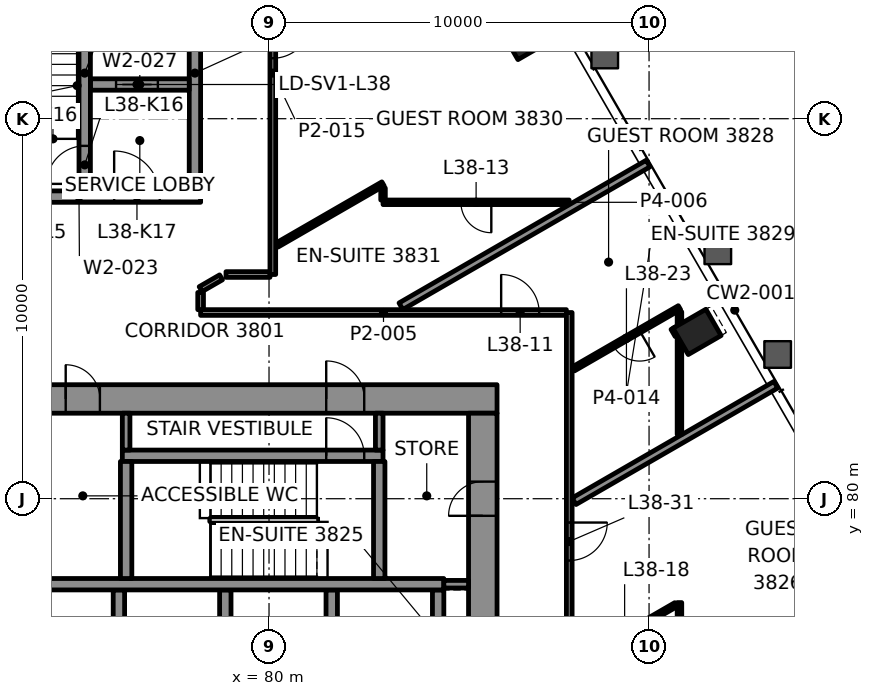
"""IFC4 building model, lengths in metres.
Left out: names, types, materials, properties, quantities, classifications, styles, units other than length and angle.
Written with IfcOpenShell. Run it as: python <this file> out.ifc"""

import sys

from ifc_helpers import new_model, si_unit, direction, frame, frame_2d, origin, origin_2d, place, context, subcontext, project, spatial, rectangle, hollow_rectangle, extrude, element, fill, save


model = new_model("IFC4")
c1 = context("Model", 3, precision=1e-05, world=origin(), true_north=direction((0.0, 1.0)))
c2 = subcontext(c1, "Body", "Model", "MODEL_VIEW")
j1 = project(units=[si_unit("LENGTHUNIT", "METRE"), si_unit("PLANEANGLEUNIT", "RADIAN")], contexts=[c1])
p1 = place(None, origin())
s1 = spatial("IfcSite", under=j1, at=p1, CompositionType="ELEMENT")
p2 = place(p1, origin())
s2 = spatial("IfcBuilding", under=s1, at=p2, CompositionType="ELEMENT")
p3 = place(p2, frame((0.0, 0.0, 167.5)))
s3 = spatial("IfcBuildingStorey", under=s2, at=p3, CompositionType="ELEMENT", Elevation=167.5)
for number, where, z_axis, x_axis in (
    (1, (91.263, 84.39, -0.0), (0.0, 0.0, 1.0), (-0.5, 0.866, 0.0)),
    (2, (86.782, 92.151, -0.0), (0.0, 0.0, 1.0), (-0.5, 0.866, 0.0)),
):
    element("IfcColumn", number, at=place(p3, frame(where, z_axis=z_axis, x_axis=x_axis)), inside=s3, PredefinedType="COLUMN", context=c2, shape_type="SweptSolid", body=[
        extrude(hollow_rectangle(XDim=0.8, YDim=1.0, WallThickness=0.05, at=origin_2d()), origin(), (0.0, 0.0, 1.0), 3.9),
    ])
p4 = place(p3, frame((64.0, 82.625, 0.0), z_axis=(0.0, 0.0, 1.0), x_axis=(1.0, 0.0, 0.0)))
e3 = element("IfcWall", 3, at=p4, inside=s3, PredefinedType="SHEAR", context=c2, shape_type="SweptSolid", body=[
    extrude(rectangle(XDim=22.0, YDim=0.75, at=frame_2d((11.0, 0.0))), origin(), (0.0, 0.0, 1.0), 3.7),
])
p5 = place(p4, frame((3.695, 0.0, 0.0)))
e4 = element("IfcOpeningElement", 4, at=p5, cuts=e3, PredefinedType="OPENING", context=c2, shape_type="SweptSolid", body=[
    extrude(rectangle(XDim=1.0, YDim=2.1, at=frame_2d((0.5, 1.05))), frame((0.0, 0.385, 0.0), z_axis=(0.0, -1.0, 0.0), x_axis=(1.0, 0.0, 0.0)), (0.0, 0.0, 1.0), 0.77),
])
p6 = place(p4, frame((17.505, 0.0, 0.0)))
e5 = element("IfcOpeningElement", 5, at=p6, cuts=e3, PredefinedType="OPENING", context=c2, shape_type="SweptSolid", body=[
    extrude(rectangle(XDim=1.0, YDim=2.1, at=frame_2d((0.5, 1.05))), frame((0.0, 0.385, 0.0), z_axis=(0.0, -1.0, 0.0), x_axis=(1.0, 0.0, 0.0)), (0.0, 0.0, 1.0), 0.77),
])
p7 = place(p4, frame((10.65, 0.0, 0.0)))
e6 = element("IfcOpeningElement", 6, at=p7, cuts=e3, PredefinedType="OPENING", context=c2, shape_type="SweptSolid", body=[
    extrude(rectangle(XDim=0.9, YDim=2.1, at=frame_2d((0.45, 1.05))), frame((0.0, 0.385, 0.0), z_axis=(0.0, -1.0, 0.0), x_axis=(1.0, 0.0, 0.0)), (0.0, 0.0, 1.0), 0.77),
])
p8 = place(p3, frame((85.625, 67.75, 0.0), z_axis=(0.0, 0.0, 1.0), x_axis=(0.0, 1.0, 0.0)))
e7 = element("IfcWall", 7, at=p8, inside=s3, PredefinedType="SHEAR", context=c2, shape_type="SweptSolid", body=[
    extrude(rectangle(XDim=14.5, YDim=0.75, at=frame_2d((7.25, 0.0))), origin(), (0.0, 0.0, 1.0), 3.7),
])
p9 = place(p8, frame((4.65, 0.0, 0.0)))
e8 = element("IfcOpeningElement", 8, at=p9, cuts=e7, PredefinedType="OPENING", context=c2, shape_type="SweptSolid", body=[
    extrude(rectangle(XDim=1.8, YDim=2.1, at=frame_2d((0.9, 1.05))), frame((0.0, 0.385, 0.0), z_axis=(0.0, -1.0, 0.0), x_axis=(1.0, 0.0, 0.0)), (0.0, 0.0, 1.0), 0.77),
])
p10 = place(p8, frame((11.8, 0.0, 0.0)))
e9 = element("IfcOpeningElement", 9, at=p10, cuts=e7, PredefinedType="OPENING", context=c2, shape_type="SweptSolid", body=[
    extrude(rectangle(XDim=0.9, YDim=2.1, at=frame_2d((0.45, 1.05))), frame((0.0, 0.385, 0.0), z_axis=(0.0, -1.0, 0.0), x_axis=(1.0, 0.0, 0.0)), (0.0, 0.0, 1.0), 0.77),
])
for number, where, z_axis, x_axis in (
    (10, (76.05, 75.0, 0.0), (0.0, 0.0, 1.0), (0.0, 1.0, 0.0)),
    (11, (78.85, 75.0, 0.0), (0.0, 0.0, 1.0), (0.0, 1.0, 0.0)),
    (12, (81.65, 75.0, 0.0), (0.0, 0.0, 1.0), (0.0, 1.0, 0.0)),
    (13, (84.45, 75.0, 0.0), (0.0, 0.0, 1.0), (0.0, 1.0, 0.0)),
):
    element("IfcWall", number, at=place(p3, frame(where, z_axis=z_axis, x_axis=x_axis)), inside=s3, PredefinedType="SHEAR", context=c2, shape_type="SweptSolid", body=[
        extrude(rectangle(XDim=2.6, YDim=0.3, at=frame_2d((1.3, 0.0))), origin(), (0.0, 0.0, 1.0), 3.7),
    ])
p11 = place(p3, frame((67.15, 77.75, 0.0), z_axis=(0.0, 0.0, 1.0), x_axis=(1.0, 0.0, 0.0)))
e14 = element("IfcWall", 14, at=p11, inside=s3, PredefinedType="SHEAR", context=c2, shape_type="SweptSolid", body=[
    extrude(rectangle(XDim=17.45, YDim=0.3, at=frame_2d((8.725, 0.0))), origin(), (0.0, 0.0, 1.0), 3.7),
])
p12 = place(p11, frame((0.545, 0.0, 0.0)))
e15 = element("IfcOpeningElement", 15, at=p12, cuts=e14, PredefinedType="OPENING", context=c2, shape_type="SweptSolid", body=[
    extrude(rectangle(XDim=1.0, YDim=2.1, at=frame_2d((0.5, 1.05))), frame((0.0, 0.16, 0.0), z_axis=(0.0, -1.0, 0.0), x_axis=(1.0, 0.0, 0.0)), (0.0, 0.0, 1.0), 0.32),
])
p13 = place(p3, frame((76.14, 81.13, 0.0), z_axis=(0.0, 0.0, 1.0), x_axis=(1.0, 0.0, 0.0)))
e16 = element("IfcWall", 16, at=p13, inside=s3, PredefinedType="SHEAR", context=c2, shape_type="SweptSolid", body=[
    extrude(rectangle(XDim=6.86, YDim=0.3, at=frame_2d((3.43, 0.0))), origin(), (0.0, 0.0, 1.0), 3.7),
])
p14 = place(p13, frame((5.365, 0.0, 0.0)))
e17 = element("IfcOpeningElement", 17, at=p14, cuts=e16, PredefinedType="OPENING", context=c2, shape_type="SweptSolid", body=[
    extrude(rectangle(XDim=1.0, YDim=2.1, at=frame_2d((0.5, 1.05))), frame((0.0, 0.16, 0.0), z_axis=(0.0, -1.0, 0.0), x_axis=(1.0, 0.0, 0.0)), (0.0, 0.0, 1.0), 0.32),
])
for number, where, z_axis, x_axis in (
    (18, (76.24, 77.9, 0.0), (0.0, 0.0, 1.0), (0.0, 1.0, 0.0)),
    (19, (82.9, 77.9, 0.0), (0.0, 0.0, 1.0), (0.0, 1.0, 0.0)),
):
    element("IfcWall", number, at=place(p3, frame(where, z_axis=z_axis, x_axis=x_axis)), inside=s3, PredefinedType="SHEAR", context=c2, shape_type="SweptSolid", body=[
        extrude(rectangle(XDim=3.08, YDim=0.3, at=frame_2d((1.54, 0.0))), origin(), (0.0, 0.0, 1.0), 3.7),
    ])
p15 = place(p3, frame((71.8, 87.95, 0.0), z_axis=(0.0, 0.0, 1.0), x_axis=(1.0, 0.0, 0.0)))
e20 = element("IfcWall", 20, at=p15, inside=s3, PredefinedType="SHEAR", context=c2, shape_type="SweptSolid", body=[
    extrude(rectangle(XDim=6.4, YDim=0.3, at=frame_2d((3.2, 0.0))), origin(), (0.0, 0.0, 1.0), 3.7),
])
p16 = place(p15, frame((1.325, 0.0, 0.0)))
e21 = element("IfcOpeningElement", 21, at=p16, cuts=e20, PredefinedType="OPENING", context=c2, shape_type="SweptSolid", body=[
    extrude(rectangle(XDim=1.0, YDim=2.1, at=frame_2d((0.5, 1.05))), frame((0.0, 0.16, 0.0), z_axis=(0.0, -1.0, 0.0), x_axis=(1.0, 0.0, 0.0)), (0.0, 0.0, 1.0), 0.32),
])
p17 = place(p15, frame((4.125, 0.0, 0.0)))
e22 = element("IfcOpeningElement", 22, at=p17, cuts=e20, PredefinedType="OPENING", context=c2, shape_type="SweptSolid", body=[
    extrude(rectangle(XDim=1.2, YDim=2.1, at=frame_2d((0.6, 1.05))), frame((0.0, 0.16, 0.0), z_axis=(0.0, -1.0, 0.0), x_axis=(1.0, 0.0, 0.0)), (0.0, 0.0, 1.0), 0.32),
])
p18 = place(p3, frame((78.05, 88.1, 0.0), z_axis=(0.0, 0.0, 1.0), x_axis=(0.0, 1.0, 0.0)))
e23 = element("IfcWall", 23, at=p18, inside=s3, PredefinedType="SHEAR", context=c2, shape_type="SweptSolid", body=[
    extrude(rectangle(XDim=6.2, YDim=0.3, at=frame_2d((3.1, 0.0))), origin(), (0.0, 0.0, 1.0), 3.7),
])
p19 = place(p3, frame((75.3, 90.9, 0.0), z_axis=(0.0, 0.0, 1.0), x_axis=(1.0, 0.0, 0.0)))
e24 = element("IfcWall", 24, at=p19, inside=s3, PredefinedType="SHEAR", context=c2, shape_type="SweptSolid", body=[
    extrude(rectangle(XDim=2.6, YDim=0.3, at=frame_2d((1.3, 0.0))), origin(), (0.0, 0.0, 1.0), 3.7),
])
p20 = place(p19, frame((0.675, 0.0, 0.0)))
e25 = element("IfcOpeningElement", 25, at=p20, cuts=e24, PredefinedType="OPENING", context=c2, shape_type="SweptSolid", body=[
    extrude(rectangle(XDim=1.1, YDim=2.1, at=frame_2d((0.55, 1.05))), frame((0.0, 0.16, 0.0), z_axis=(0.0, -1.0, 0.0), x_axis=(1.0, 0.0, 0.0)), (0.0, 0.0, 1.0), 0.32),
])
p21 = place(p3, frame((75.15, 88.1, 0.0), z_axis=(0.0, 0.0, 1.0), x_axis=(0.0, 1.0, 0.0)))
e26 = element("IfcWall", 26, at=p21, inside=s3, PredefinedType="SHEAR", context=c2, shape_type="SweptSolid", body=[
    extrude(rectangle(XDim=6.2, YDim=0.3, at=frame_2d((3.1, 0.0))), origin(), (0.0, 0.0, 1.0), 3.7),
])
p22 = place(p21, frame((0.185, 0.0, 0.0)))
e27 = element("IfcOpeningElement", 27, at=p22, cuts=e26, PredefinedType="OPENING", context=c2, shape_type="SweptSolid", body=[
    extrude(rectangle(XDim=1.0, YDim=2.1, at=frame_2d((0.5, 1.05))), frame((0.0, 0.16, 0.0), z_axis=(0.0, -1.0, 0.0), x_axis=(1.0, 0.0, 0.0)), (0.0, 0.0, 1.0), 0.32),
])
p23 = place(p3, frame((78.2, 84.9, 0.0), z_axis=(0.0, 0.0, 1.0), x_axis=(1.0, 0.0, 0.0)))
e28 = element("IfcWall", 28, at=p23, inside=s3, PredefinedType="PARTITIONING", context=c2, shape_type="SweptSolid", body=[
    extrude(rectangle(XDim=9.625, YDim=0.15, at=frame_2d((4.812, 0.0))), origin(), (0.0, 0.0, 1.0), 3.1),
])
p24 = place(p23, frame((7.908, 0.0, 0.0)))
e29 = element("IfcOpeningElement", 29, at=p24, cuts=e28, PredefinedType="OPENING", context=c2, shape_type="SweptSolid", body=[
    extrude(rectangle(XDim=1.0, YDim=2.1, at=frame_2d((0.5, 1.05))), frame((0.0, 0.085, 0.0), z_axis=(0.0, -1.0, 0.0), x_axis=(1.0, 0.0, 0.0)), (0.0, 0.0, 1.0), 0.17),
])
p25 = place(p3, frame((78.868, 85.9, 0.0), z_axis=(0.0, 0.0, 1.0), x_axis=(1.0, 0.0, 0.0)))
e30 = element("IfcWall", 30, at=p25, inside=s3, PredefinedType="PARTITIONING", context=c2, shape_type="SweptSolid", body=[
    extrude(rectangle(XDim=1.157, YDim=0.15, at=frame_2d((0.578, 0.0))), origin(), (0.0, 0.0, 1.0), 3.1),
])
p26 = place(p3, frame((87.898, 87.8, 0.0), z_axis=(0.0, 0.0, 1.0), x_axis=(-1.0, 0.0, 0.0)))
e31 = element("IfcWall", 31, at=p26, inside=s3, PredefinedType="PARTITIONING", context=c2, shape_type="SweptSolid", body=[
    extrude(rectangle(XDim=4.898, YDim=0.12, at=frame_2d((2.449, 0.0))), origin(), (0.0, 0.0, 1.0), 3.1),
])
p27 = place(p26, frame((2.049, 0.0, 0.0)))
e32 = element("IfcOpeningElement", 32, at=p27, cuts=e31, PredefinedType="OPENING", context=c2, shape_type="SweptSolid", body=[
    extrude(rectangle(XDim=0.8, YDim=2.1, at=frame_2d((0.4, 1.05))), frame((0.0, 0.07, 0.0), z_axis=(0.0, -1.0, 0.0), x_axis=(1.0, 0.0, 0.0)), (0.0, 0.0, 1.0), 0.14),
])
p28 = place(p3, frame((90.705, 77.212, 0.0), z_axis=(0.0, 0.0, 1.0), x_axis=(-0.866009247561, -0.500027982357, 0.0)))
e33 = element("IfcWall", 33, at=p28, inside=s3, PredefinedType="PARTITIONING", context=c2, shape_type="SweptSolid", body=[
    extrude(rectangle(XDim=3.113, YDim=0.12, at=frame_2d((1.556, 0.0))), origin(), (0.0, 0.0, 1.0), 3.1),
])
p29 = place(p28, frame((1.156, 0.0, 0.0)))
e34 = element("IfcOpeningElement", 34, at=p29, cuts=e33, PredefinedType="OPENING", context=c2, shape_type="SweptSolid", body=[
    extrude(rectangle(XDim=0.8, YDim=2.1, at=frame_2d((0.4, 1.05))), frame((0.0, 0.07, 0.0), z_axis=(0.0, -1.0, 0.0), x_axis=(1.0, 0.0, 0.0)), (0.0, 0.0, 1.0), 0.14),
])
p30 = place(p3, frame((88.027, 79.934, 0.0), z_axis=(0.0, 0.0, 1.0), x_axis=(0.866029087811, 0.499993619025, 0.0)))
e35 = element("IfcWall", 35, at=p30, inside=s3, PredefinedType="PARTITIONING", context=c2, shape_type="SweptSolid", body=[
    extrude(rectangle(XDim=6.131, YDim=0.2, at=frame_2d((3.065, 0.0))), origin(), (0.0, 0.0, 1.0), 3.022),
])
p31 = place(p3, frame((90.8, 85.028, 0.0), z_axis=(0.0, 0.0, 1.0), x_axis=(-0.866010186656, -0.500026355914, 0.0)))
e36 = element("IfcWall", 36, at=p31, inside=s3, PredefinedType="PARTITIONING", context=c2, shape_type="SweptSolid", body=[
    extrude(rectangle(XDim=3.222, YDim=0.12, at=frame_2d((1.611, 0.0))), origin(), (0.0, 0.0, 1.0), 3.022),
])
p32 = place(p31, frame((1.211, 0.0, 0.0)))
e37 = element("IfcOpeningElement", 37, at=p32, cuts=e36, PredefinedType="OPENING", context=c2, shape_type="SweptSolid", body=[
    extrude(rectangle(XDim=0.8, YDim=2.1, at=frame_2d((0.4, 1.05))), frame((0.0, 0.07, 0.0), z_axis=(0.0, -1.0, 0.0), x_axis=(1.0, 0.0, 0.0)), (0.0, 0.0, 1.0), 0.14),
])
p33 = place(p3, frame((83.471, 85.065, 0.0), z_axis=(0.0, 0.0, 1.0), x_axis=(0.866022108301, 0.500005707901, 0.0)))
e38 = element("IfcWall", 38, at=p33, inside=s3, PredefinedType="PARTITIONING", context=c2, shape_type="SweptSolid", body=[
    extrude(rectangle(XDim=7.511, YDim=0.2, at=frame_2d((3.755, 0.0))), origin(), (0.0, 0.0, 1.0), 3.022),
])
p34 = place(p3, frame((78.2, 85.515, 0.0), z_axis=(0.0, 0.0, 1.0), x_axis=(0.866035156036, 0.499983108224, 0.0)))
e39 = element("IfcWall", 39, at=p34, inside=s3, PredefinedType="PARTITIONING", context=c2, shape_type="SweptSolid", body=[
    extrude(rectangle(XDim=0.622, YDim=0.15, at=frame_2d((0.311, 0.0))), origin(), (0.0, 0.0, 1.0), 3.1),
])
p35 = place(p3, frame((80.209, 86.675, 0.0), z_axis=(0.0, 0.0, 1.0), x_axis=(0.86604299788, 0.499969524894, 0.0)))
e40 = element("IfcWall", 40, at=p35, inside=s3, PredefinedType="PARTITIONING", context=c2, shape_type="SweptSolid", body=[
    extrude(rectangle(XDim=3.222, YDim=0.12, at=frame_2d((1.611, 0.0))), origin(), (0.0, 0.0, 1.0), 3.1),
])
p36 = place(p3, frame((90.8, 73.929, 0.0), z_axis=(0.0, 0.0, 1.0), x_axis=(0.0, 1.0, 0.0)))
e41 = element("IfcWall", 41, at=p36, inside=s3, PredefinedType="PARTITIONING", context=c2, shape_type="SweptSolid", body=[
    extrude(rectangle(XDim=3.337, YDim=0.12, at=frame_2d((1.668, 0.0))), origin(), (0.0, 0.0, 1.0), 3.1),
])
p37 = place(p3, frame((90.8, 81.69, 0.0), z_axis=(0.0, 0.0, 1.0), x_axis=(0.0, 1.0, 0.0)))
e42 = element("IfcWall", 42, at=p37, inside=s3, PredefinedType="PARTITIONING", context=c2, shape_type="SweptSolid", body=[
    extrude(rectangle(XDim=2.502, YDim=0.12, at=frame_2d((1.251, 0.0))), origin(), (0.0, 0.0, 1.0), 3.1),
])
p38 = place(p3, frame((90.8, 84.584, 0.0), z_axis=(0.0, 0.0, 1.0), x_axis=(0.0, 1.0, 0.0)))
e43 = element("IfcWall", 43, at=p38, inside=s3, PredefinedType="PARTITIONING", context=c2, shape_type="SweptSolid", body=[
    extrude(rectangle(XDim=0.334, YDim=0.12, at=frame_2d((0.167, 0.0))), origin(), (0.0, 0.0, 1.0), 3.022),
])
p39 = place(p3, frame((87.9, 84.899, 0.0), z_axis=(0.0, 0.0, 1.0), x_axis=(0.0, -1.0, 0.0)))
e44 = element("IfcWall", 44, at=p39, inside=s3, PredefinedType="PARTITIONING", context=c2, shape_type="SweptSolid", body=[
    extrude(rectangle(XDim=16.308, YDim=0.15, at=frame_2d((8.154, 0.0))), origin(), (0.0, 0.0, 1.0), 3.1),
])
p40 = place(p39, frame((5.527, 0.0, 0.0)))
e45 = element("IfcOpeningElement", 45, at=p40, cuts=e44, PredefinedType="OPENING", context=c2, shape_type="SweptSolid", body=[
    extrude(rectangle(XDim=1.0, YDim=2.1, at=frame_2d((0.5, 1.05))), frame((0.0, 0.085, 0.0), z_axis=(0.0, -1.0, 0.0), x_axis=(1.0, 0.0, 0.0)), (0.0, 0.0, 1.0), 0.17),
])
p41 = place(p39, frame((13.074, 0.0, 0.0)))
e46 = element("IfcOpeningElement", 46, at=p41, cuts=e44, PredefinedType="OPENING", context=c2, shape_type="SweptSolid", body=[
    extrude(rectangle(XDim=1.0, YDim=2.1, at=frame_2d((0.5, 1.05))), frame((0.0, 0.085, 0.0), z_axis=(0.0, -1.0, 0.0), x_axis=(1.0, 0.0, 0.0)), (0.0, 0.0, 1.0), 0.17),
])
p42 = place(p3, frame((83.0, 87.86, 0.0), z_axis=(0.0, 0.0, 1.0), x_axis=(0.0, 1.0, 0.0)))
e47 = element("IfcWall", 47, at=p42, inside=s3, PredefinedType="PARTITIONING", context=c2, shape_type="SweptSolid", body=[
    extrude(rectangle(XDim=0.316, YDim=0.12, at=frame_2d((0.158, 0.0))), origin(), (0.0, 0.0, 1.0), 3.1),
])
p43 = place(p3, frame((80.1, 96.5, 0.0), z_axis=(0.0, 0.0, 1.0), x_axis=(0.0, -1.0, 0.0)))
e48 = element("IfcWall", 48, at=p43, inside=s3, PredefinedType="PARTITIONING", context=c2, shape_type="SweptSolid", body=[
    extrude(rectangle(XDim=10.6, YDim=0.15, at=frame_2d((5.3, 0.0))), origin(), (0.0, 0.0, 1.0), 3.022),
])
p44 = place(p43, frame((3.909, 0.0, 0.0)))
e49 = element("IfcOpeningElement", 49, at=p44, cuts=e48, PredefinedType="OPENING", context=c2, shape_type="SweptSolid", body=[
    extrude(rectangle(XDim=1.0, YDim=2.1, at=frame_2d((0.5, 1.05))), frame((0.0, 0.085, 0.0), z_axis=(0.0, -1.0, 0.0), x_axis=(1.0, 0.0, 0.0)), (0.0, 0.0, 1.0), 0.17),
])
p45 = place(p3, frame((78.2, 84.975, 0.0), z_axis=(0.0, 0.0, 1.0), x_axis=(0.0, 1.0, 0.0)))
e50 = element("IfcWall", 50, at=p45, inside=s3, PredefinedType="PARTITIONING", context=c2, shape_type="SweptSolid", body=[
    extrude(rectangle(XDim=0.453, YDim=0.15, at=frame_2d((0.226, 0.0))), origin(), (0.0, 0.0, 1.0), 3.1),
])
p46 = place(p3, frame((90.74, 84.296, 0.0), z_axis=(0.0, 0.0, 1.0), x_axis=(-0.500333292614, 0.865832891673, 0.0)))
e51 = element("IfcWall", 51, at=p46, inside=s3, PredefinedType="PARTITIONING", context=c2, shape_type="SweptSolid", body=[
    extrude(rectangle(XDim=0.219, YDim=0.12, at=frame_2d((0.109, 0.0))), origin(), (0.0, 0.0, 1.0), 3.1),
])
p47 = place(p3, frame((84.6, 77.75, 0.0), z_axis=(0.0, 0.0, 1.0), x_axis=(1.0, 0.0, 0.0)))
e52 = element("IfcWall", 52, at=p47, inside=s3, PredefinedType="PARTITIONING", context=c2, shape_type="SweptSolid", body=[
    extrude(rectangle(XDim=0.65, YDim=0.2, at=frame_2d((0.325, 0.0))), origin(), (0.0, 0.0, 1.0), 3.7),
])
for number, where, z_axis, x_axis in (
    (53, (76.24, 81.28, 0.0), (0.0, 0.0, 1.0), (0.0, 1.0, 0.0)),
    (54, (82.9, 81.28, 0.0), (0.0, 0.0, 1.0), (0.0, 1.0, 0.0)),
):
    element("IfcWall", number, at=place(p3, frame(where, z_axis=z_axis, x_axis=x_axis)), inside=s3, PredefinedType="PARTITIONING", context=c2, shape_type="SweptSolid", body=[
        extrude(rectangle(XDim=0.97, YDim=0.2, at=frame_2d((0.485, 0.0))), origin(), (0.0, 0.0, 1.0), 3.7),
    ])
p48 = place(p24, origin())
e55 = element("IfcDoor", 55, at=p48, inside=s3, OperationType="SINGLE_SWING_LEFT", PredefinedType="DOOR", context=c2, shape_type="SweptSolid", body=[
    extrude(rectangle(XDim=1.0, YDim=2.1, at=frame_2d((0.5, 1.05))), frame((0.0, 0.025, 0.0), z_axis=(0.0, -1.0, 0.0), x_axis=(1.0, 0.0, 0.0)), (0.0, 0.0, 1.0), 0.05),
])
fill(e29, e55)
p49 = place(p27, origin())
e56 = element("IfcDoor", 56, at=p49, inside=s3, OperationType="SINGLE_SWING_LEFT", PredefinedType="DOOR", context=c2, shape_type="SweptSolid", body=[
    extrude(rectangle(XDim=0.8, YDim=2.1, at=frame_2d((0.4, 1.05))), frame((0.0, 0.025, 0.0), z_axis=(0.0, -1.0, 0.0), x_axis=(1.0, 0.0, 0.0)), (0.0, 0.0, 1.0), 0.05),
])
fill(e32, e56)
p50 = place(p32, origin())
e57 = element("IfcDoor", 57, at=p50, inside=s3, OperationType="SINGLE_SWING_LEFT", PredefinedType="DOOR", context=c2, shape_type="SweptSolid", body=[
    extrude(rectangle(XDim=0.8, YDim=2.1, at=frame_2d((0.4, 1.05))), frame((0.0, 0.025, 0.0), z_axis=(0.0, -1.0, 0.0), x_axis=(1.0, 0.0, 0.0)), (0.0, 0.0, 1.0), 0.05),
])
fill(e37, e57)
p51 = place(p40, origin())
e58 = element("IfcDoor", 58, at=p51, inside=s3, OperationType="SINGLE_SWING_RIGHT", PredefinedType="DOOR", context=c2, shape_type="SweptSolid", body=[
    extrude(rectangle(XDim=1.0, YDim=2.1, at=frame_2d((0.5, 1.05))), frame((0.0, 0.025, 0.0), z_axis=(0.0, -1.0, 0.0), x_axis=(1.0, 0.0, 0.0)), (0.0, 0.0, 1.0), 0.05),
])
fill(e45, e58)
p52 = place(p44, origin())
e59 = element("IfcDoor", 59, at=p52, inside=s3, OperationType="SINGLE_SWING_RIGHT", PredefinedType="DOOR", context=c2, shape_type="SweptSolid", body=[
    extrude(rectangle(XDim=1.0, YDim=2.1, at=frame_2d((0.5, 1.05))), frame((0.0, 0.025, 0.0), z_axis=(0.0, -1.0, 0.0), x_axis=(1.0, 0.0, 0.0)), (0.0, 0.0, 1.0), 0.05),
])
fill(e49, e59)
p53 = place(p20, origin())
e60 = element("IfcDoor", 60, at=p53, inside=s3, OperationType="DOUBLE_DOOR_SLIDING", PredefinedType="DOOR", context=c2, shape_type="SweptSolid", body=[
    extrude(rectangle(XDim=1.1, YDim=2.1, at=frame_2d((0.55, 1.05))), frame((0.0, 0.025, 0.0), z_axis=(0.0, -1.0, 0.0), x_axis=(1.0, 0.0, 0.0)), (0.0, 0.0, 1.0), 0.05),
])
fill(e25, e60)
p54 = place(p14, origin())
e61 = element("IfcDoor", 61, at=p54, inside=s3, OperationType="SINGLE_SWING_RIGHT", PredefinedType="DOOR", context=c2, shape_type="SweptSolid", body=[
    extrude(rectangle(XDim=1.0, YDim=2.1, at=frame_2d((0.5, 1.05))), frame((0.0, 0.025, 0.0), z_axis=(0.0, -1.0, 0.0), x_axis=(1.0, 0.0, 0.0)), (0.0, 0.0, 1.0), 0.05),
])
fill(e17, e61)
p55 = place(p6, origin())
e62 = element("IfcDoor", 62, at=p55, inside=s3, OperationType="SINGLE_SWING_LEFT", PredefinedType="DOOR", context=c2, shape_type="SweptSolid", body=[
    extrude(rectangle(XDim=1.0, YDim=2.1, at=frame_2d((0.5, 1.05))), frame((0.0, 0.095, 0.0), z_axis=(0.0, -1.0, 0.0), x_axis=(1.0, 0.0, 0.0)), (0.0, 0.0, 1.0), 0.19),
])
fill(e5, e62)
p56 = place(p22, origin())
e63 = element("IfcDoor", 63, at=p56, inside=s3, OperationType="SINGLE_SWING_LEFT", PredefinedType="DOOR", context=c2, shape_type="SweptSolid", body=[
    extrude(rectangle(XDim=1.0, YDim=2.1, at=frame_2d((0.5, 1.05))), frame((0.0, 0.025, 0.0), z_axis=(0.0, -1.0, 0.0), x_axis=(1.0, 0.0, 0.0)), (0.0, 0.0, 1.0), 0.05),
])
fill(e27, e63)
p57 = place(p17, origin())
e64 = element("IfcDoor", 64, at=p57, inside=s3, OperationType="SINGLE_SWING_RIGHT", PredefinedType="DOOR", context=c2, shape_type="SweptSolid", body=[
    extrude(rectangle(XDim=1.2, YDim=2.1, at=frame_2d((0.6, 1.05))), frame((0.0, 0.025, 0.0), z_axis=(0.0, -1.0, 0.0), x_axis=(1.0, 0.0, 0.0)), (0.0, 0.0, 1.0), 0.05),
])
fill(e22, e64)
p58 = place(p7, origin())
e65 = element("IfcDoor", 65, at=p58, inside=s3, OperationType="SINGLE_SWING_LEFT", PredefinedType="DOOR", context=c2, shape_type="SweptSolid", body=[
    extrude(rectangle(XDim=0.9, YDim=2.1, at=frame_2d((0.45, 1.05))), frame((0.0, 0.095, 0.0), z_axis=(0.0, -1.0, 0.0), x_axis=(1.0, 0.0, 0.0)), (0.0, 0.0, 1.0), 0.19),
])
fill(e6, e65)
p59 = place(p10, origin())
e66 = element("IfcDoor", 66, at=p59, inside=s3, OperationType="SINGLE_SWING_RIGHT", PredefinedType="DOOR", context=c2, shape_type="SweptSolid", body=[
    extrude(rectangle(XDim=0.9, YDim=2.1, at=frame_2d((0.45, 1.05))), frame((0.0, 0.095, 0.0), z_axis=(0.0, -1.0, 0.0), x_axis=(1.0, 0.0, 0.0)), (0.0, 0.0, 1.0), 0.19),
])
fill(e9, e66)
save(model, sys.argv[1])
